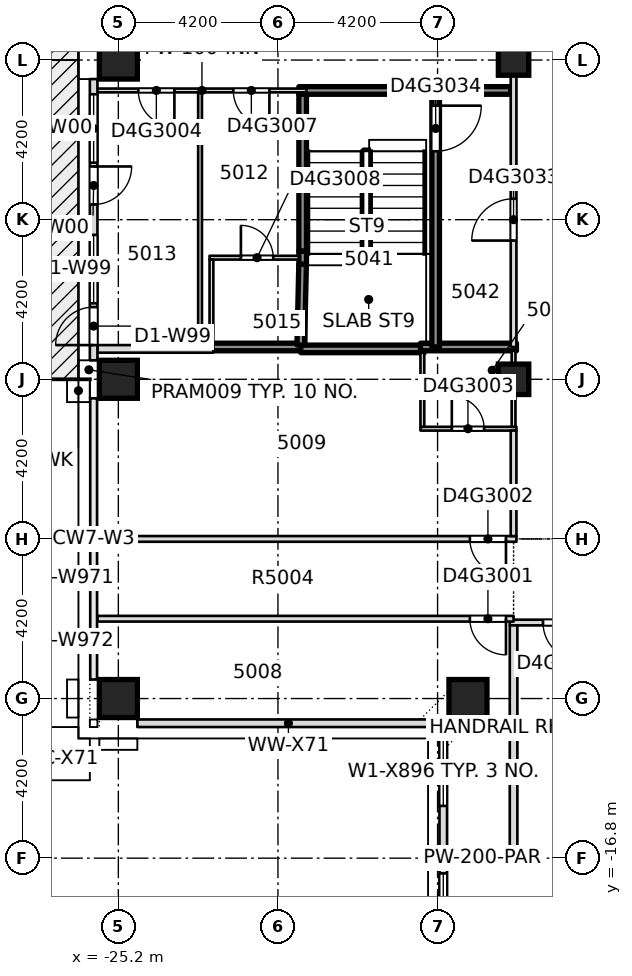
"""IFC4 building model, lengths in metres.
Left out: names, types, materials, properties, quantities, classifications, styles, units other than length and angle.
Written with IfcOpenShell. Run it as: python <this file> out.ifc"""

import sys

from ifc_helpers import new_model, si_unit, direction, frame, frame_2d, origin, origin_2d, place, context, subcontext, project, spatial, rectangle, extrude, element, fill, save


model = new_model("IFC4")
c1 = context("Model", 3, precision=1e-05, world=origin(), true_north=direction((0.0, 1.0)))
c2 = subcontext(c1, "Body", "Model", "MODEL_VIEW")
j1 = project(units=[si_unit("LENGTHUNIT", "METRE"), si_unit("PLANEANGLEUNIT", "RADIAN")], contexts=[c1])
p1 = place(None, origin())
s1 = spatial("IfcSite", under=j1, at=p1, CompositionType="ELEMENT")
p2 = place(p1, origin())
s2 = spatial("IfcBuilding", under=s1, at=p2, CompositionType="ELEMENT")
p3 = place(p2, frame((0.0, 0.0, 192.8)))
s3 = spatial("IfcBuildingStorey", under=s2, at=p3, CompositionType="ELEMENT", Elevation=192.8)
for number, where, z_axis, x_axis in (
    (1, (-25.2, -12.6, -0.4), (0.0, 0.0, 1.0), (1.0, 0.0, 0.0)),
    (2, (-16.0, -12.6, -0.4), (0.0, 0.0, 1.0), (1.0, 0.0, 0.0)),
    (3, (-25.2, -4.2, -0.4), (0.0, 0.0, 1.0), (1.0, 0.0, 0.0)),
    (4, (-25.2, 4.2, -0.4), (0.0, 0.0, 1.0), (1.0, 0.0, 0.0)),
):
    element("IfcColumn", number, at=place(p3, frame(where, z_axis=z_axis, x_axis=x_axis)), inside=s3, PredefinedType="COLUMN", context=c2, shape_type="SweptSolid", body=[
        extrude(rectangle(XDim=1.0, YDim=1.0, at=origin_2d()), origin(), (0.0, 0.0, 1.0), 3.45),
    ])
for number, where, z_axis, x_axis in (
    (5, (-14.8, -4.2, -0.4), (0.0, 0.0, 1.0), (1.0, 0.0, 0.0)),
    (6, (-14.8, 4.2, -0.4), (0.0, 0.0, 1.0), (1.0, 0.0, 0.0)),
):
    element("IfcColumn", number, at=place(p3, frame(where, z_axis=z_axis, x_axis=x_axis)), inside=s3, PredefinedType="COLUMN", context=c2, shape_type="SweptSolid", body=[
        extrude(rectangle(XDim=0.8, YDim=0.8, at=origin_2d()), origin(), (0.0, 0.0, 1.0), 3.45),
    ])
p4 = place(p3, frame((-16.55, -16.8, 0.0), z_axis=(0.0, 0.0, 1.0), x_axis=(1.0, 0.0, 0.0)))
e7 = element("IfcWall", 7, at=p4, inside=s3, PredefinedType="PARTITIONING", context=c2, shape_type="SweptSolid", body=[
    extrude(rectangle(XDim=1.848, YDim=0.2, at=frame_2d((0.924, 0.0))), origin(), (0.0, 0.0, 1.0), 3.05),
])
p5 = place(p3, frame((-14.9, -10.6, 0.0), z_axis=(0.0, 0.0, 1.0), x_axis=(1.0, 0.0, 0.0)))
e8 = element("IfcWall", 8, at=p5, inside=s3, PredefinedType="PARTITIONING", context=c2, shape_type="SweptSolid", body=[
    extrude(rectangle(XDim=10.4, YDim=0.15, at=frame_2d((5.2, 0.0))), origin(), (0.0, 0.0, 1.0), 3.05),
])
p6 = place(p5, frame((7.875, 0.0, 0.0)))
e9 = element("IfcOpeningElement", 9, at=p6, cuts=e8, PredefinedType="OPENING", context=c2, shape_type="SweptSolid", body=[
    extrude(rectangle(XDim=0.95, YDim=2.1, at=frame_2d((0.475, 1.05))), frame((0.0, 0.085, 0.0), z_axis=(0.0, -1.0, 0.0), x_axis=(1.0, 0.0, 0.0)), (0.0, 0.0, 1.0), 0.17),
])
p7 = place(p5, frame((3.95, 0.0, 0.0)))
e10 = element("IfcOpeningElement", 10, at=p7, cuts=e8, PredefinedType="OPENING", context=c2, shape_type="SweptSolid", body=[
    extrude(rectangle(XDim=1.1, YDim=2.1, at=frame_2d((0.55, 1.05))), frame((0.0, 0.085, 0.0), z_axis=(0.0, -1.0, 0.0), x_axis=(1.0, 0.0, 0.0)), (0.0, 0.0, 1.0), 0.17),
])
p8 = place(p5, frame((0.875, 0.0, 0.0)))
e11 = element("IfcOpeningElement", 11, at=p8, cuts=e8, PredefinedType="OPENING", context=c2, shape_type="SweptSolid", body=[
    extrude(rectangle(XDim=1.0, YDim=2.1, at=frame_2d((0.5, 1.05))), frame((0.0, 0.085, 0.0), z_axis=(0.0, -1.0, 0.0), x_axis=(1.0, 0.0, 0.0)), (0.0, 0.0, 1.0), 0.17),
])
p9 = place(p3, frame((-25.75, -10.5, 0.0), z_axis=(0.0, 0.0, 1.0), x_axis=(1.0, 0.0, 0.0)))
e12 = element("IfcWall", 12, at=p9, inside=s3, PredefinedType="PARTITIONING", context=c2, shape_type="SweptSolid", body=[
    extrude(rectangle(XDim=10.95, YDim=0.15, at=frame_2d((5.475, 0.0))), origin(), (0.0, 0.0, 1.0), 3.05),
])
p10 = place(p9, frame((9.8, 0.0, 0.0)))
e13 = element("IfcOpeningElement", 13, at=p10, cuts=e12, PredefinedType="OPENING", context=c2, shape_type="SweptSolid", body=[
    extrude(rectangle(XDim=0.95, YDim=2.1, at=frame_2d((0.475, 1.05))), frame((0.0, 0.085, 0.0), z_axis=(0.0, -1.0, 0.0), x_axis=(1.0, 0.0, 0.0)), (0.0, 0.0, 1.0), 0.17),
])
p11 = place(p3, frame((-25.75, -8.4, 0.0), z_axis=(0.0, 0.0, 1.0), x_axis=(1.0, 0.0, 0.0)))
e14 = element("IfcWall", 14, at=p11, inside=s3, PredefinedType="PARTITIONING", context=c2, shape_type="SweptSolid", body=[
    extrude(rectangle(XDim=11.025, YDim=0.15, at=frame_2d((5.512, 0.0))), origin(), (0.0, 0.0, 1.0), 3.05),
])
p12 = place(p11, frame((9.8, 0.0, 0.0)))
e15 = element("IfcOpeningElement", 15, at=p12, cuts=e14, PredefinedType="OPENING", context=c2, shape_type="SweptSolid", body=[
    extrude(rectangle(XDim=0.95, YDim=2.1, at=frame_2d((0.475, 1.05))), frame((0.0, 0.085, 0.0), z_axis=(0.0, -1.0, 0.0), x_axis=(1.0, 0.0, 0.0)), (0.0, 0.0, 1.0), 0.17),
])
p13 = place(p3, frame((-17.25, -5.5, 0.0), z_axis=(0.0, 0.0, 1.0), x_axis=(1.0, 0.0, 0.0)))
e16 = element("IfcWall", 16, at=p13, inside=s3, PredefinedType="PARTITIONING", context=c2, shape_type="SweptSolid", body=[
    extrude(rectangle(XDim=2.525, YDim=0.1, at=frame_2d((1.262, 0.0))), origin(), (0.0, 0.0, 1.0), 3.05),
])
p14 = place(p13, frame((0.825, 0.0, 0.0)))
e17 = element("IfcOpeningElement", 17, at=p14, cuts=e16, PredefinedType="OPENING", context=c2, shape_type="SweptSolid", body=[
    extrude(rectangle(XDim=0.85, YDim=2.1, at=frame_2d((0.425, 1.05))), frame((0.0, 0.06, 0.0), z_axis=(0.0, -1.0, 0.0), x_axis=(1.0, 0.0, 0.0)), (0.0, 0.0, 1.0), 0.12),
])
p15 = place(p3, frame((-25.75, -3.4, 0.0), z_axis=(0.0, 0.0, 1.0), x_axis=(1.0, 0.0, 0.0)))
e18 = element("IfcWall", 18, at=p15, inside=s3, PredefinedType="PARTITIONING", context=c2, shape_type="SweptSolid", body=[
    extrude(rectangle(XDim=3.05, YDim=0.2, at=frame_2d((1.525, 0.0))), origin(), (0.0, 0.0, 1.0), 3.05),
])
p16 = place(p3, frame((-22.8, -3.35, 0.0), z_axis=(0.0, 0.0, 1.0), x_axis=(1.0, 0.0, 0.0)))
e19 = element("IfcWall", 19, at=p16, inside=s3, PredefinedType="SOLIDWALL", context=c2, shape_type="SweptSolid", body=[
    extrude(rectangle(XDim=2.5, YDim=0.2, at=frame_2d((1.25, 0.0))), origin(), (0.0, 0.0, 1.0), 3.05),
])
p17 = place(p3, frame((-20.4, -3.4, 0.0), z_axis=(0.0, 0.0, 1.0), x_axis=(1.0, 0.0, 0.0)))
e20 = element("IfcWall", 20, at=p17, inside=s3, PredefinedType="SOLIDWALL", context=c2, shape_type="SweptSolid", body=[
    extrude(rectangle(XDim=3.25, YDim=0.2, at=frame_2d((1.625, 0.0))), origin(), (0.0, 0.0, 1.0), 3.05),
])
p18 = place(p3, frame((-17.25, -3.35, 0.0), z_axis=(0.0, 0.0, 1.0), x_axis=(1.0, 0.0, 0.0)))
e21 = element("IfcWall", 21, at=p18, inside=s3, PredefinedType="SOLIDWALL", context=c2, shape_type="SweptSolid", body=[
    extrude(rectangle(XDim=2.525, YDim=0.2, at=frame_2d((1.262, 0.0))), origin(), (0.0, 0.0, 1.0), 3.05),
])
p19 = place(p3, frame((-22.8, -1.0, 0.0), z_axis=(0.0, 0.0, 1.0), x_axis=(1.0, 0.0, 0.0)))
e22 = element("IfcWall", 22, at=p19, inside=s3, PredefinedType="PARTITIONING", context=c2, shape_type="SweptSolid", body=[
    extrude(rectangle(XDim=2.35, YDim=0.1, at=frame_2d((1.175, 0.0))), origin(), (0.0, 0.0, 1.0), 3.05),
])
p20 = place(p19, frame((0.825, 0.0, 0.0)))
e23 = element("IfcOpeningElement", 23, at=p20, cuts=e22, PredefinedType="OPENING", context=c2, shape_type="SweptSolid", body=[
    extrude(rectangle(XDim=0.85, YDim=2.1, at=frame_2d((0.425, 1.05))), frame((0.0, 0.06, 0.0), z_axis=(0.0, -1.0, 0.0), x_axis=(1.0, 0.0, 0.0)), (0.0, 0.0, 1.0), 0.12),
])
p21 = place(p3, frame((-25.75, 3.4, 0.0), z_axis=(0.0, 0.0, 1.0), x_axis=(1.0, 0.0, 0.0)))
e24 = element("IfcWall", 24, at=p21, inside=s3, PredefinedType="PARTITIONING", context=c2, shape_type="SweptSolid", body=[
    extrude(rectangle(XDim=5.5, YDim=0.1, at=frame_2d((2.75, 0.0))), origin(), (0.0, 0.0, 1.0), 3.05),
])
p22 = place(p21, frame((1.075, 0.0, 0.0)))
e25 = element("IfcOpeningElement", 25, at=p22, cuts=e24, PredefinedType="OPENING", context=c2, shape_type="SweptSolid", body=[
    extrude(rectangle(XDim=0.95, YDim=2.1, at=frame_2d((0.475, 1.05))), frame((0.0, 0.06, 0.0), z_axis=(0.0, -1.0, 0.0), x_axis=(1.0, 0.0, 0.0)), (0.0, 0.0, 1.0), 0.12),
])
p23 = place(p21, frame((3.575, 0.0, 0.0)))
e26 = element("IfcOpeningElement", 26, at=p23, cuts=e24, PredefinedType="OPENING", context=c2, shape_type="SweptSolid", body=[
    extrude(rectangle(XDim=0.95, YDim=2.1, at=frame_2d((0.475, 1.05))), frame((0.0, 0.06, 0.0), z_axis=(0.0, -1.0, 0.0), x_axis=(1.0, 0.0, 0.0)), (0.0, 0.0, 1.0), 0.12),
])
p24 = place(p3, frame((-20.45, 3.4, 0.0), z_axis=(0.0, 0.0, 1.0), x_axis=(1.0, 0.0, 0.0)))
e27 = element("IfcWall", 27, at=p24, inside=s3, PredefinedType="SOLIDWALL", context=c2, shape_type="SweptSolid", body=[
    extrude(rectangle(XDim=5.575, YDim=0.2, at=frame_2d((2.788, 0.0))), origin(), (0.0, 0.0, 1.0), 3.05),
])
p25 = place(p3, frame((-23.05, -3.3, 0.0), z_axis=(0.0, 0.0, 1.0), x_axis=(0.0, 1.0, 0.0)))
e28 = element("IfcWall", 28, at=p25, inside=s3, PredefinedType="PARTITIONING", context=c2, shape_type="SweptSolid", body=[
    extrude(rectangle(XDim=6.65, YDim=0.1, at=frame_2d((3.325, 0.0))), origin(), (0.0, 0.0, 1.0), 3.05),
])
p26 = place(p3, frame((-22.75, -3.3, 0.0), z_axis=(0.0, 0.0, 1.0), x_axis=(0.0, 1.0, 0.0)))
e29 = element("IfcWall", 29, at=p26, inside=s3, PredefinedType="PARTITIONING", context=c2, shape_type="SweptSolid", body=[
    extrude(rectangle(XDim=2.25, YDim=0.1, at=frame_2d((1.125, 0.0))), origin(), (0.0, 0.0, 1.0), 3.05),
])
p27 = place(p3, frame((-20.4, -3.3, 0.0), z_axis=(0.0, 0.0, 1.0), x_axis=(0.022687568549, 0.99974260399, 0.0)))
e30 = element("IfcWall", 30, at=p27, inside=s3, PredefinedType="SOLIDWALL", context=c2, shape_type="SweptSolid", body=[
    extrude(rectangle(XDim=2.131, YDim=0.2, at=frame_2d((1.065, 0.0))), origin(), (0.0, 0.0, 1.0), 3.05),
])
p28 = place(p3, frame((-20.35, -0.83, 0.0), z_axis=(0.0, 0.0, 1.0), x_axis=(0.0, 1.0, 0.0)))
e31 = element("IfcWall", 31, at=p28, inside=s3, PredefinedType="SOLIDWALL", context=c2, shape_type="SweptSolid", body=[
    extrude(rectangle(XDim=4.13, YDim=0.2, at=frame_2d((2.065, 0.0))), origin(), (0.0, 0.0, 1.0), 3.05),
])
p29 = place(p3, frame((-17.2, -5.45, 0.0), z_axis=(0.0, 0.0, 1.0), x_axis=(0.0, 1.0, 0.0)))
e32 = element("IfcWall", 32, at=p29, inside=s3, PredefinedType="PARTITIONING", context=c2, shape_type="SweptSolid", body=[
    extrude(rectangle(XDim=1.95, YDim=0.1, at=frame_2d((0.975, 0.0))), origin(), (0.0, 0.0, 1.0), 3.05),
])
p30 = place(p3, frame((-16.85, -3.35, 0.0), z_axis=(0.0, 0.0, 1.0), x_axis=(0.0, 1.0, 0.0)))
e33 = element("IfcWall", 33, at=p30, inside=s3, PredefinedType="SOLIDWALL", context=c2, shape_type="SweptSolid", body=[
    extrude(rectangle(XDim=6.65, YDim=0.2, at=frame_2d((3.325, 0.0))), origin(), (0.0, 0.0, 1.0), 3.05),
])
p31 = place(p30, frame((5.15, 0.0, 0.0)))
e34 = element("IfcOpeningElement", 34, at=p31, cuts=e33, PredefinedType="OPENING", context=c2, shape_type="SweptSolid", body=[
    extrude(rectangle(XDim=1.2, YDim=2.1, at=frame_2d((0.6, 1.05))), frame((0.0, 0.11, 0.0), z_axis=(0.0, -1.0, 0.0), x_axis=(1.0, 0.0, 0.0)), (0.0, 0.0, 1.0), 0.22),
])
p32 = place(p3, frame((-14.8, -16.698, 0.0), z_axis=(0.0, 0.0, 1.0), x_axis=(0.0, 1.0, 0.0)))
e35 = element("IfcWall", 35, at=p32, inside=s3, PredefinedType="PARTITIONING", context=c2, shape_type="SweptSolid", body=[
    extrude(rectangle(XDim=6.023, YDim=0.2, at=frame_2d((3.011, 0.0))), origin(), (0.0, 0.0, 1.0), 3.05),
])
p33 = place(p3, frame((-14.8, -8.325, 0.0), z_axis=(0.0, 0.0, 1.0), x_axis=(0.0, 1.0, 0.0)))
e36 = element("IfcWall", 36, at=p33, inside=s3, PredefinedType="PARTITIONING", context=c2, shape_type="SweptSolid", body=[
    extrude(rectangle(XDim=2.775, YDim=0.15, at=frame_2d((1.387, 0.0))), origin(), (0.0, 0.0, 1.0), 3.05),
])
p34 = place(p3, frame((-14.8, -5.45, 0.0), z_axis=(0.0, 0.0, 1.0), x_axis=(0.0, 1.0, 0.0)))
e37 = element("IfcWall", 37, at=p34, inside=s3, PredefinedType="PARTITIONING", context=c2, shape_type="SweptSolid", body=[
    extrude(rectangle(XDim=2.0, YDim=0.1, at=frame_2d((1.0, 0.0))), origin(), (0.0, 0.0, 1.0), 3.05),
])
p35 = place(p3, frame((-14.8, -3.35, 0.0), z_axis=(0.0, 0.0, 1.0), x_axis=(0.0, 1.0, 0.0)))
e38 = element("IfcWall", 38, at=p35, inside=s3, PredefinedType="PARTITIONING", context=c2, shape_type="SweptSolid", body=[
    extrude(rectangle(XDim=11.675, YDim=0.15, at=frame_2d((5.837, 0.0))), origin(), (0.0, 0.0, 1.0), 3.05),
])
p36 = place(p35, frame((2.8, 0.0, 0.0)))
e39 = element("IfcOpeningElement", 39, at=p36, cuts=e38, PredefinedType="OPENING", context=c2, shape_type="SweptSolid", body=[
    extrude(rectangle(XDim=1.1, YDim=2.1, at=frame_2d((0.55, 1.05))), frame((0.0, 0.085, 0.0), z_axis=(0.0, -1.0, 0.0), x_axis=(1.0, 0.0, 0.0)), (0.0, 0.0, 1.0), 0.17),
])
p37 = place(p3, frame((-25.85, 3.7, 0.0), z_axis=(0.0, 0.0, 1.0), x_axis=(0.0, -1.0, 0.0)))
e40 = element("IfcWall", 40, at=p37, inside=s3, PredefinedType="STANDARD", context=c2, shape_type="SweptSolid", body=[
    extrude(rectangle(XDim=7.4, YDim=0.2, at=frame_2d((3.7, 0.0))), origin(), (0.0, 0.0, 1.0), 3.05),
])
p38 = place(p37, frame((4.1, 0.0, 0.2)))
e41 = element("IfcOpeningElement", 41, at=p38, cuts=e40, PredefinedType="OPENING", context=c2, shape_type="SweptSolid", body=[
    extrude(rectangle(XDim=1.8, YDim=2.65, at=frame_2d((0.9, 1.325))), frame((0.0, 0.11, 0.0), z_axis=(0.0, -1.0, 0.0), x_axis=(1.0, 0.0, 0.0)), (0.0, 0.0, 1.0), 0.22),
])
p39 = place(p37, frame((6.0, 0.0, 0.0)))
e42 = element("IfcOpeningElement", 42, at=p39, cuts=e40, PredefinedType="OPENING", context=c2, shape_type="SweptSolid", body=[
    extrude(rectangle(XDim=1.0, YDim=2.4, at=frame_2d((0.5, 1.2))), frame((0.0, 0.11, 0.0), z_axis=(0.0, -1.0, 0.0), x_axis=(1.0, 0.0, 0.0)), (0.0, 0.0, 1.0), 0.22),
])
p40 = place(p37, frame((0.4, 0.0, 0.2)))
e43 = element("IfcOpeningElement", 43, at=p40, cuts=e40, PredefinedType="OPENING", context=c2, shape_type="SweptSolid", body=[
    extrude(rectangle(XDim=1.8, YDim=2.65, at=frame_2d((0.9, 1.325))), frame((0.0, 0.11, 0.0), z_axis=(0.0, -1.0, 0.0), x_axis=(1.0, 0.0, 0.0)), (0.0, 0.0, 1.0), 0.22),
])
p41 = place(p37, frame((2.3, 0.0, 0.0)))
e44 = element("IfcOpeningElement", 44, at=p41, cuts=e40, PredefinedType="OPENING", context=c2, shape_type="SweptSolid", body=[
    extrude(rectangle(XDim=1.0, YDim=2.4, at=frame_2d((0.5, 1.2))), frame((0.0, 0.11, 0.0), z_axis=(0.0, -1.0, 0.0), x_axis=(1.0, 0.0, 0.0)), (0.0, 0.0, 1.0), 0.22),
])
p42 = place(p3, frame((-24.7, -13.25, 0.0), z_axis=(0.0, 0.0, 1.0), x_axis=(1.0, 0.0, 0.0)))
e45 = element("IfcWall", 45, at=p42, inside=s3, PredefinedType="STANDARD", context=c2, shape_type="SweptSolid", body=[
    extrude(rectangle(XDim=7.95, YDim=0.2, at=frame_2d((3.975, 0.0))), origin(), (0.0, 0.0, 1.0), 3.05),
])
p43 = place(p3, frame((-16.65, -13.35, 0.0), z_axis=(0.0, 0.0, 1.0), x_axis=(0.0, -1.0, 0.0)))
e46 = element("IfcWall", 46, at=p43, inside=s3, PredefinedType="STANDARD", context=c2, shape_type="SweptSolid", body=[
    extrude(rectangle(XDim=7.15, YDim=0.2, at=frame_2d((3.575, 0.0))), origin(), (0.0, 0.0, 1.0), 3.05),
])
p44 = place(p43, frame((3.85, 0.0, 0.2)))
e47 = element("IfcOpeningElement", 47, at=p44, cuts=e46, PredefinedType="OPENING", context=c2, shape_type="SweptSolid", body=[
    extrude(rectangle(XDim=1.8, YDim=2.65, at=frame_2d((0.9, 1.325))), frame((0.0, 0.11, 0.0), z_axis=(0.0, -1.0, 0.0), x_axis=(1.0, 0.0, 0.0)), (0.0, 0.0, 1.0), 0.22),
])
p45 = place(p43, frame((0.275, 0.0, 0.2)))
e48 = element("IfcOpeningElement", 48, at=p45, cuts=e46, PredefinedType="OPENING", context=c2, shape_type="SweptSolid", body=[
    extrude(rectangle(XDim=1.8, YDim=2.65, at=frame_2d((0.9, 1.325))), frame((0.0, 0.11, 0.0), z_axis=(0.0, -1.0, 0.0), x_axis=(1.0, 0.0, 0.0)), (0.0, 0.0, 1.0), 0.22),
])
p46 = place(p3, frame((-20.35, -1.17, 0.0), z_axis=(0.0, 0.0, 1.0), x_axis=(0.0, 1.0, 0.0)))
e49 = element("IfcWall", 49, at=p46, inside=s3, PredefinedType="SOLIDWALL", context=c2, shape_type="SweptSolid", body=[
    extrude(rectangle(XDim=0.34, YDim=0.2, at=frame_2d((0.17, 0.0))), origin(), (0.0, 0.0, 1.0), 3.05),
])
p47 = place(p10, origin())
e50 = element("IfcDoor", 50, at=p47, inside=s3, OperationType="SINGLE_SWING_RIGHT", PredefinedType="DOOR", context=c2, shape_type="SweptSolid", body=[
    extrude(rectangle(XDim=0.95, YDim=2.1, at=frame_2d((0.475, 1.05))), frame((0.0, 0.025, 0.0), z_axis=(0.0, -1.0, 0.0), x_axis=(1.0, 0.0, 0.0)), (0.0, 0.0, 1.0), 0.05),
])
fill(e13, e50)
p48 = place(p12, origin())
e51 = element("IfcDoor", 51, at=p48, inside=s3, OperationType="SINGLE_SWING_LEFT", PredefinedType="DOOR", context=c2, shape_type="SweptSolid", body=[
    extrude(rectangle(XDim=0.95, YDim=2.1, at=frame_2d((0.475, 1.05))), frame((0.0, 0.025, 0.0), z_axis=(0.0, -1.0, 0.0), x_axis=(1.0, 0.0, 0.0)), (0.0, 0.0, 1.0), 0.05),
])
fill(e15, e51)
p49 = place(p14, origin())
e52 = element("IfcDoor", 52, at=p49, inside=s3, OperationType="SINGLE_SWING_LEFT", PredefinedType="DOOR", context=c2, shape_type="SweptSolid", body=[
    extrude(rectangle(XDim=0.85, YDim=2.1, at=frame_2d((0.425, 1.05))), frame((0.0, 0.025, 0.0), z_axis=(0.0, -1.0, 0.0), x_axis=(1.0, 0.0, 0.0)), (0.0, 0.0, 1.0), 0.05),
])
fill(e17, e52)
p50 = place(p22, origin())
e53 = element("IfcDoor", 53, at=p50, inside=s3, OperationType="SINGLE_SWING_RIGHT", PredefinedType="DOOR", context=c2, shape_type="SweptSolid", body=[
    extrude(rectangle(XDim=0.95, YDim=2.1, at=frame_2d((0.475, 1.05))), frame((0.0, 0.025, 0.0), z_axis=(0.0, -1.0, 0.0), x_axis=(1.0, 0.0, 0.0)), (0.0, 0.0, 1.0), 0.05),
])
fill(e25, e53)
p51 = place(p23, origin())
e54 = element("IfcDoor", 54, at=p51, inside=s3, OperationType="SINGLE_SWING_RIGHT", PredefinedType="DOOR", context=c2, shape_type="SweptSolid", body=[
    extrude(rectangle(XDim=0.95, YDim=2.1, at=frame_2d((0.475, 1.05))), frame((0.0, 0.025, 0.0), z_axis=(0.0, -1.0, 0.0), x_axis=(1.0, 0.0, 0.0)), (0.0, 0.0, 1.0), 0.05),
])
fill(e26, e54)
p52 = place(p20, origin())
e55 = element("IfcDoor", 55, at=p52, inside=s3, OperationType="SINGLE_SWING_RIGHT", PredefinedType="DOOR", context=c2, shape_type="SweptSolid", body=[
    extrude(rectangle(XDim=0.85, YDim=2.1, at=frame_2d((0.425, 1.05))), frame((0.0, 0.025, 0.0), z_axis=(0.0, -1.0, 0.0), x_axis=(1.0, 0.0, 0.0)), (0.0, 0.0, 1.0), 0.05),
])
fill(e23, e55)
p53 = place(p36, origin())
e56 = element("IfcDoor", 56, at=p53, inside=s3, OperationType="SINGLE_SWING_RIGHT", PredefinedType="DOOR", context=c2, shape_type="SweptSolid", body=[
    extrude(rectangle(XDim=1.1, YDim=2.1, at=frame_2d((0.55, 1.05))), frame((0.0, 0.025, 0.0), z_axis=(0.0, -1.0, 0.0), x_axis=(1.0, 0.0, 0.0)), (0.0, 0.0, 1.0), 0.05),
])
fill(e39, e56)
p54 = place(p31, origin())
e57 = element("IfcDoor", 57, at=p54, inside=s3, OperationType="SINGLE_SWING_RIGHT", PredefinedType="DOOR", context=c2, shape_type="SweptSolid", body=[
    extrude(rectangle(XDim=1.2, YDim=2.1, at=frame_2d((0.6, 1.05))), frame((0.0, 0.025, 0.0), z_axis=(0.0, -1.0, 0.0), x_axis=(1.0, 0.0, 0.0)), (0.0, 0.0, 1.0), 0.05),
])
fill(e34, e57)
p55 = place(p8, origin())
e58 = element("IfcDoor", 58, at=p55, inside=s3, OperationType="SINGLE_SWING_RIGHT", PredefinedType="DOOR", context=c2, shape_type="SweptSolid", body=[
    extrude(rectangle(XDim=1.0, YDim=2.1, at=frame_2d((0.5, 1.05))), frame((0.0, 0.025, 0.0), z_axis=(0.0, -1.0, 0.0), x_axis=(1.0, 0.0, 0.0)), (0.0, 0.0, 1.0), 0.05),
])
fill(e11, e58)
p56 = place(p38, origin())
e59 = element("IfcWindow", 59, at=p56, inside=s3, PartitioningType="SINGLE_PANEL", PredefinedType="WINDOW", context=c2, shape_type="SweptSolid", body=[
    extrude(rectangle(XDim=1.8, YDim=2.65, at=frame_2d((0.9, 1.325))), frame((0.0, 0.03, 0.0), z_axis=(0.0, -1.0, 0.0), x_axis=(1.0, 0.0, 0.0)), (0.0, 0.0, 1.0), 0.06),
])
fill(e41, e59)
p57 = place(p39, origin())
e60 = element("IfcDoor", 60, at=p57, inside=s3, OperationType="SINGLE_SWING_LEFT", PredefinedType="DOOR", context=c2, shape_type="SweptSolid", body=[
    extrude(rectangle(XDim=1.0, YDim=2.4, at=frame_2d((0.5, 1.2))), frame((0.0, 0.025, 0.0), z_axis=(0.0, -1.0, 0.0), x_axis=(1.0, 0.0, 0.0)), (0.0, 0.0, 1.0), 0.05),
])
fill(e42, e60)
p58 = place(p40, origin())
e61 = element("IfcWindow", 61, at=p58, inside=s3, PartitioningType="SINGLE_PANEL", PredefinedType="WINDOW", context=c2, shape_type="SweptSolid", body=[
    extrude(rectangle(XDim=1.8, YDim=2.65, at=frame_2d((0.9, 1.325))), frame((0.0, 0.03, 0.0), z_axis=(0.0, -1.0, 0.0), x_axis=(1.0, 0.0, 0.0)), (0.0, 0.0, 1.0), 0.06),
])
fill(e43, e61)
p59 = place(p41, origin())
e62 = element("IfcDoor", 62, at=p59, inside=s3, OperationType="SINGLE_SWING_LEFT", PredefinedType="DOOR", context=c2, shape_type="SweptSolid", body=[
    extrude(rectangle(XDim=1.0, YDim=2.4, at=frame_2d((0.5, 1.2))), frame((0.0, 0.025, 0.0), z_axis=(0.0, -1.0, 0.0), x_axis=(1.0, 0.0, 0.0)), (0.0, 0.0, 1.0), 0.05),
])
fill(e44, e62)
p60 = place(p44, origin())
e63 = element("IfcWindow", 63, at=p60, inside=s3, PartitioningType="SINGLE_PANEL", PredefinedType="WINDOW", context=c2, shape_type="SweptSolid", body=[
    extrude(rectangle(XDim=1.8, YDim=2.65, at=frame_2d((0.9, 1.325))), frame((0.0, 0.03, 0.0), z_axis=(0.0, -1.0, 0.0), x_axis=(1.0, 0.0, 0.0)), (0.0, 0.0, 1.0), 0.06),
])
fill(e47, e63)
p61 = place(p45, origin())
e64 = element("IfcWindow", 64, at=p61, inside=s3, PartitioningType="SINGLE_PANEL", PredefinedType="WINDOW", context=c2, shape_type="SweptSolid", body=[
    extrude(rectangle(XDim=1.8, YDim=2.65, at=frame_2d((0.9, 1.325))), frame((0.0, 0.03, 0.0), z_axis=(0.0, -1.0, 0.0), x_axis=(1.0, 0.0, 0.0)), (0.0, 0.0, 1.0), 0.06),
])
fill(e48, e64)
save(model, sys.argv[1])
